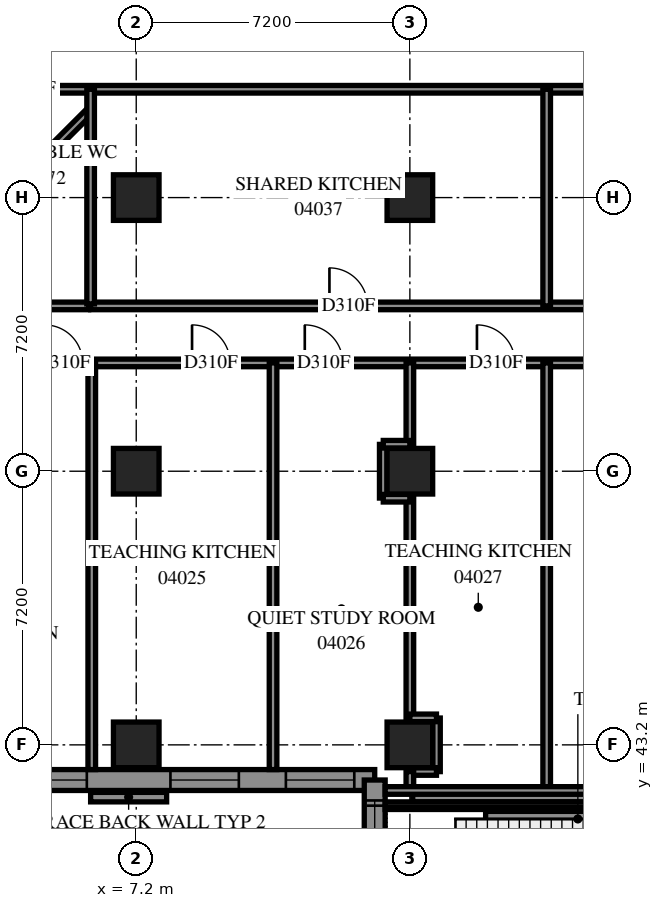
"""IFC4 building model, lengths in metres.
Left out: names, types, materials, properties, quantities, classifications, styles, units other than length and angle.
Written with IfcOpenShell. Run it as: python <this file> out.ifc"""

import sys

from ifc_helpers import new_model, si_unit, direction, frame, frame_2d, origin, origin_2d, place, context, subcontext, project, spatial, polyline, rectangle, outline, extrude, element, fill, save


model = new_model("IFC4")
c1 = context("Model", 3, precision=1e-05, world=origin(), true_north=direction((0.0, 1.0)))
c2 = subcontext(c1, "Body", "Model", "MODEL_VIEW")
j1 = project(units=[si_unit("LENGTHUNIT", "METRE"), si_unit("PLANEANGLEUNIT", "RADIAN")], contexts=[c1])
p1 = place(None, origin())
s1 = spatial("IfcSite", under=j1, at=p1, CompositionType="ELEMENT")
p2 = place(p1, origin())
s2 = spatial("IfcBuilding", under=s1, at=p2, CompositionType="ELEMENT")
p3 = place(p2, frame((0.0, 0.0, 18.6)))
s3 = spatial("IfcBuildingStorey", under=s2, at=p3, CompositionType="ELEMENT", Elevation=18.6)
for number, where, z_axis, x_axis in (
    (1, (7.2, 43.2, 0.0), (0.0, 0.0, 1.0), (1.0, 0.0, 0.0)),
    (2, (7.2, 50.4, 0.0), (0.0, 0.0, 1.0), (1.0, 0.0, 0.0)),
    (3, (7.2, 57.6, 0.0), (0.0, 0.0, 1.0), (1.0, 0.0, 0.0)),
    (4, (14.4, 43.2, 0.0), (0.0, 0.0, 1.0), (1.0, 0.0, 0.0)),
    (5, (14.4, 50.4, 0.0), (0.0, 0.0, 1.0), (1.0, 0.0, 0.0)),
    (6, (14.4, 57.6, 0.0), (0.0, 0.0, 1.0), (1.0, 0.0, 0.0)),
):
    element("IfcColumn", number, at=place(p3, frame(where, z_axis=z_axis, x_axis=x_axis)), inside=s3, PredefinedType="COLUMN", context=c2, shape_type="SweptSolid", body=[
        extrude(rectangle(XDim=1.2, YDim=1.2, at=origin_2d()), origin(), (0.0, 0.0, 1.0), 3.8),
    ])
p4 = place(p3, frame((0.275, 42.275, 0.0), z_axis=(0.0, 0.0, 1.0), x_axis=(1.0, 0.0, 0.0)))
e7 = element("IfcWall", 7, at=p4, inside=s3, PredefinedType="SOLIDWALL", context=c2, shape_type="SweptSolid", body=[
    extrude(outline(polyline([(-0.275, -0.275), (12.925, -0.275), (13.475, 0.275), (0.275, 0.275), (-0.275, -0.275)])), origin(), (0.0, 0.0, 1.0), 3.8),
])
p5 = place(p4, frame((1.0, 0.0, 0.7)))
e8 = element("IfcOpeningElement", 8, at=p5, cuts=e7, PredefinedType="OPENING", context=c2, shape_type="SweptSolid", body=[
    extrude(rectangle(XDim=1.8, YDim=2.4, at=frame_2d((0.9, 1.2))), frame((0.0, 0.285, 0.0), z_axis=(0.0, -1.0, 0.0), x_axis=(1.0, 0.0, 0.0)), (0.0, 0.0, 1.0), 0.57),
])
p6 = place(p4, frame((3.825, 0.0, 0.7)))
e9 = element("IfcOpeningElement", 9, at=p6, cuts=e7, PredefinedType="OPENING", context=c2, shape_type="SweptSolid", body=[
    extrude(rectangle(XDim=1.8, YDim=2.4, at=frame_2d((0.9, 1.2))), frame((0.0, 0.285, 0.0), z_axis=(0.0, -1.0, 0.0), x_axis=(1.0, 0.0, 0.0)), (0.0, 0.0, 1.0), 0.57),
])
p7 = place(p4, frame((7.825, 0.0, 0.7)))
e10 = element("IfcOpeningElement", 10, at=p7, cuts=e7, PredefinedType="OPENING", context=c2, shape_type="SweptSolid", body=[
    extrude(rectangle(XDim=1.8, YDim=2.4, at=frame_2d((0.9, 1.2))), frame((0.0, 0.285, 0.0), z_axis=(0.0, -1.0, 0.0), x_axis=(1.0, 0.0, 0.0)), (0.0, 0.0, 1.0), 0.57),
])
p8 = place(p4, frame((10.863, 0.0, 0.7)))
e11 = element("IfcOpeningElement", 11, at=p8, cuts=e7, PredefinedType="OPENING", context=c2, shape_type="SweptSolid", body=[
    extrude(rectangle(XDim=1.8, YDim=2.4, at=frame_2d((0.9, 1.2))), frame((0.0, 0.285, 0.0), z_axis=(0.0, -1.0, 0.0), x_axis=(1.0, 0.0, 0.0)), (0.0, 0.0, 1.0), 0.57),
])
p9 = place(p3, frame((13.475, 42.275, 0.0), z_axis=(0.0, 0.0, 1.0), x_axis=(0.0, -1.0, 0.0)))
e12 = element("IfcWall", 12, at=p9, inside=s3, PredefinedType="SOLIDWALL", context=c2, shape_type="SweptSolid", body=[
    extrude(outline(polyline([(0.275, -0.275), (7.475, -0.275), (6.925, 0.275), (-0.275, 0.275), (0.275, -0.275)])), origin(), (0.0, 0.0, 1.0), 3.8),
])
p10 = place(p9, frame((0.537, 0.0, 0.7)))
e13 = element("IfcOpeningElement", 13, at=p10, cuts=e12, PredefinedType="OPENING", context=c2, shape_type="SweptSolid", body=[
    extrude(rectangle(XDim=1.8, YDim=2.4, at=frame_2d((0.9, 1.2))), frame((0.0, 0.285, 0.0), z_axis=(0.0, -1.0, 0.0), x_axis=(1.0, 0.0, 0.0)), (0.0, 0.0, 1.0), 0.57),
])
p11 = place(p9, frame((3.575, 0.0, 0.7)))
e14 = element("IfcOpeningElement", 14, at=p11, cuts=e12, PredefinedType="OPENING", context=c2, shape_type="SweptSolid", body=[
    extrude(rectangle(XDim=1.8, YDim=2.4, at=frame_2d((0.9, 1.2))), frame((0.0, 0.285, 0.0), z_axis=(0.0, -1.0, 0.0), x_axis=(1.0, 0.0, 0.0)), (0.0, 0.0, 1.0), 0.57),
])
p12 = place(p3, frame((17.854, 41.15, 0.0), z_axis=(0.0, 0.0, 1.0), x_axis=(0.0, -1.0, 0.0)))
e15 = element("IfcWall", 15, at=p12, inside=s3, PredefinedType="SOLIDWALL", context=c2, shape_type="SweptSolid", body=[
    extrude(rectangle(XDim=1.6, YDim=0.3, at=frame_2d((0.8, 0.0))), origin(), (0.0, 0.0, 1.0), 1.209),
])
p13 = place(p3, frame((0.0, 53.25, 0.0), z_axis=(0.0, 0.0, 1.0), x_axis=(1.0, 0.0, 0.0)))
e16 = element("IfcWall", 16, at=p13, inside=s3, PredefinedType="PARTITIONING", context=c2, shape_type="SweptSolid", body=[
    extrude(rectangle(XDim=55.1, YDim=0.2, at=frame_2d((27.55, 0.0))), origin(), (0.0, 0.0, 1.0), 3.8),
])
p14 = place(p13, frame((8.669, 0.0, 0.0)))
e17 = element("IfcOpeningElement", 17, at=p14, cuts=e16, PredefinedType="OPENING", context=c2, shape_type="SweptSolid", body=[
    extrude(rectangle(XDim=1.0, YDim=2.1, at=frame_2d((0.5, 1.05))), frame((0.0, 0.11, 0.0), z_axis=(0.0, -1.0, 0.0), x_axis=(1.0, 0.0, 0.0)), (0.0, 0.0, 1.0), 0.22),
])
p15 = place(p13, frame((11.635, 0.0, 0.0)))
e18 = element("IfcOpeningElement", 18, at=p15, cuts=e16, PredefinedType="OPENING", context=c2, shape_type="SweptSolid", body=[
    extrude(rectangle(XDim=1.0, YDim=2.1, at=frame_2d((0.5, 1.05))), frame((0.0, 0.11, 0.0), z_axis=(0.0, -1.0, 0.0), x_axis=(1.0, 0.0, 0.0)), (0.0, 0.0, 1.0), 0.22),
])
p16 = place(p13, frame((16.165, 0.0, 0.0)))
e19 = element("IfcOpeningElement", 19, at=p16, cuts=e16, PredefinedType="OPENING", context=c2, shape_type="SweptSolid", body=[
    extrude(rectangle(XDim=1.0, YDim=2.1, at=frame_2d((0.5, 1.05))), frame((0.0, 0.11, 0.0), z_axis=(0.0, -1.0, 0.0), x_axis=(1.0, 0.0, 0.0)), (0.0, 0.0, 1.0), 0.22),
])
p17 = place(p13, frame((20.337, 0.0, 0.0)))
e20 = element("IfcOpeningElement", 20, at=p17, cuts=e16, PredefinedType="OPENING", context=c2, shape_type="SweptSolid", body=[
    extrude(rectangle(XDim=1.0, YDim=2.1, at=frame_2d((0.5, 1.05))), frame((0.0, 0.11, 0.0), z_axis=(0.0, -1.0, 0.0), x_axis=(1.0, 0.0, 0.0)), (0.0, 0.0, 1.0), 0.22),
])
p18 = place(p13, frame((27.538, 0.0, 0.0)))
e21 = element("IfcOpeningElement", 21, at=p18, cuts=e16, PredefinedType="OPENING", context=c2, shape_type="SweptSolid", body=[
    extrude(rectangle(XDim=1.0, YDim=2.1, at=frame_2d((0.5, 1.05))), frame((0.0, 0.11, 0.0), z_axis=(0.0, -1.0, 0.0), x_axis=(1.0, 0.0, 0.0)), (0.0, 0.0, 1.0), 0.22),
])
p19 = place(p13, frame((34.737, 0.0, 0.0)))
e22 = element("IfcOpeningElement", 22, at=p19, cuts=e16, PredefinedType="OPENING", context=c2, shape_type="SweptSolid", body=[
    extrude(rectangle(XDim=1.0, YDim=2.1, at=frame_2d((0.5, 1.05))), frame((0.0, 0.11, 0.0), z_axis=(0.0, -1.0, 0.0), x_axis=(1.0, 0.0, 0.0)), (0.0, 0.0, 1.0), 0.22),
])
p20 = place(p13, frame((40.125, 0.0, 0.0)))
e23 = element("IfcOpeningElement", 23, at=p20, cuts=e16, PredefinedType="OPENING", context=c2, shape_type="SweptSolid", body=[
    extrude(rectangle(XDim=1.0, YDim=2.1, at=frame_2d((0.5, 1.05))), frame((0.0, 0.11, 0.0), z_axis=(0.0, -1.0, 0.0), x_axis=(1.0, 0.0, 0.0)), (0.0, 0.0, 1.0), 0.22),
])
p21 = place(p13, frame((46.758, 0.0, 0.0)))
e24 = element("IfcOpeningElement", 24, at=p21, cuts=e16, PredefinedType="OPENING", context=c2, shape_type="SweptSolid", body=[
    extrude(rectangle(XDim=1.0, YDim=2.1, at=frame_2d((0.5, 1.05))), frame((0.0, 0.11, 0.0), z_axis=(0.0, -1.0, 0.0), x_axis=(1.0, 0.0, 0.0)), (0.0, 0.0, 1.0), 0.22),
])
p22 = place(p13, frame((53.913, 0.0, 0.0)))
e25 = element("IfcOpeningElement", 25, at=p22, cuts=e16, PredefinedType="OPENING", context=c2, shape_type="SweptSolid", body=[
    extrude(rectangle(XDim=1.0, YDim=2.1, at=frame_2d((0.5, 1.05))), frame((0.0, 0.11, 0.0), z_axis=(0.0, -1.0, 0.0), x_axis=(1.0, 0.0, 0.0)), (0.0, 0.0, 1.0), 0.22),
])
p23 = place(p13, frame((2.672, 0.0, 0.0)))
e26 = element("IfcOpeningElement", 26, at=p23, cuts=e16, PredefinedType="OPENING", context=c2, shape_type="SweptSolid", body=[
    extrude(rectangle(XDim=1.0, YDim=2.1, at=frame_2d((0.5, 1.05))), frame((0.0, 0.11, 0.0), z_axis=(0.0, -1.0, 0.0), x_axis=(1.0, 0.0, 0.0)), (0.0, 0.0, 1.0), 0.22),
])
p24 = place(p13, frame((4.788, 0.0, 0.0)))
e27 = element("IfcOpeningElement", 27, at=p24, cuts=e16, PredefinedType="OPENING", context=c2, shape_type="SweptSolid", body=[
    extrude(rectangle(XDim=1.0, YDim=2.1, at=frame_2d((0.5, 1.05))), frame((0.0, 0.11, 0.0), z_axis=(0.0, -1.0, 0.0), x_axis=(1.0, 0.0, 0.0)), (0.0, 0.0, 1.0), 0.22),
])
p25 = place(p3, frame((0.002, 60.45, 0.0), z_axis=(0.0, 0.0, 1.0), x_axis=(1.0, 0.0, 0.0)))
e28 = element("IfcWall", 28, at=p25, inside=s3, PredefinedType="PARTITIONING", context=c2, shape_type="SweptSolid", body=[
    extrude(rectangle(XDim=55.098, YDim=0.2, at=frame_2d((27.549, 0.0))), origin(), (0.0, 0.0, 1.0), 3.8),
])
p26 = place(p25, frame((49.69, 0.0, 0.0)))
e29 = element("IfcOpeningElement", 29, at=p26, cuts=e28, PredefinedType="OPENING", context=c2, shape_type="SweptSolid", body=[
    extrude(rectangle(XDim=1.0, YDim=2.1, at=frame_2d((0.5, 1.05))), frame((0.0, 0.11, 0.0), z_axis=(0.0, -1.0, 0.0), x_axis=(1.0, 0.0, 0.0)), (0.0, 0.0, 1.0), 0.22),
])
p27 = place(p25, frame((3.897, 0.0, 0.0)))
e30 = element("IfcOpeningElement", 30, at=p27, cuts=e28, PredefinedType="OPENING", context=c2, shape_type="SweptSolid", body=[
    extrude(rectangle(XDim=1.0, YDim=2.1, at=frame_2d((0.5, 1.05))), frame((0.0, 0.11, 0.0), z_axis=(0.0, -1.0, 0.0), x_axis=(1.0, 0.0, 0.0)), (0.0, 0.0, 1.0), 0.22),
])
p28 = place(p3, frame((6.0, 54.75, 0.0), z_axis=(0.0, 0.0, 1.0), x_axis=(1.0, 0.0, 0.0)))
e31 = element("IfcWall", 31, at=p28, inside=s3, PredefinedType="PARTITIONING", context=c2, shape_type="SweptSolid", body=[
    extrude(rectangle(XDim=49.1, YDim=0.2, at=frame_2d((24.55, 0.0))), origin(), (0.0, 0.0, 1.0), 3.8),
])
p29 = place(p28, frame((6.284, 0.0, 0.0)))
e32 = element("IfcOpeningElement", 32, at=p29, cuts=e31, PredefinedType="OPENING", context=c2, shape_type="SweptSolid", body=[
    extrude(rectangle(XDim=1.0, YDim=2.1, at=frame_2d((0.5, 1.05))), frame((0.0, 0.11, 0.0), z_axis=(0.0, -1.0, 0.0), x_axis=(1.0, 0.0, 0.0)), (0.0, 0.0, 1.0), 0.22),
])
p30 = place(p28, frame((14.374, 0.0, 0.0)))
e33 = element("IfcOpeningElement", 33, at=p30, cuts=e31, PredefinedType="OPENING", context=c2, shape_type="SweptSolid", body=[
    extrude(rectangle(XDim=1.0, YDim=2.1, at=frame_2d((0.5, 1.05))), frame((0.0, 0.11, 0.0), z_axis=(0.0, -1.0, 0.0), x_axis=(1.0, 0.0, 0.0)), (0.0, 0.0, 1.0), 0.22),
])
p31 = place(p28, frame((19.725, 0.0, 0.0)))
e34 = element("IfcOpeningElement", 34, at=p31, cuts=e31, PredefinedType="OPENING", context=c2, shape_type="SweptSolid", body=[
    extrude(rectangle(XDim=1.0, YDim=2.1, at=frame_2d((0.5, 1.05))), frame((0.0, 0.11, 0.0), z_axis=(0.0, -1.0, 0.0), x_axis=(1.0, 0.0, 0.0)), (0.0, 0.0, 1.0), 0.22),
])
p32 = place(p28, frame((28.183, 0.0, 0.0)))
e35 = element("IfcOpeningElement", 35, at=p32, cuts=e31, PredefinedType="OPENING", context=c2, shape_type="SweptSolid", body=[
    extrude(rectangle(XDim=1.0, YDim=2.1, at=frame_2d((0.5, 1.05))), frame((0.0, 0.11, 0.0), z_axis=(0.0, -1.0, 0.0), x_axis=(1.0, 0.0, 0.0)), (0.0, 0.0, 1.0), 0.22),
])
p33 = place(p28, frame((35.974, 0.0, 0.0)))
e36 = element("IfcOpeningElement", 36, at=p33, cuts=e31, PredefinedType="OPENING", context=c2, shape_type="SweptSolid", body=[
    extrude(rectangle(XDim=1.0, YDim=2.1, at=frame_2d((0.5, 1.05))), frame((0.0, 0.11, 0.0), z_axis=(0.0, -1.0, 0.0), x_axis=(1.0, 0.0, 0.0)), (0.0, 0.0, 1.0), 0.22),
])
p34 = place(p3, frame((18.0, 42.0, 0.0), z_axis=(0.0, 0.0, 1.0), x_axis=(0.0, 1.0, 0.0)))
e37 = element("IfcWall", 37, at=p34, inside=s3, PredefinedType="PARTITIONING", context=c2, shape_type="SweptSolid", body=[
    extrude(rectangle(XDim=11.25, YDim=0.2, at=frame_2d((5.625, 0.0))), origin(), (0.0, 0.0, 1.0), 3.8),
])
for number, where, z_axis, x_axis in (
    (38, (6.03, 42.55, 0.0), (0.0, 0.0, 1.0), (0.0, 1.0, 0.0)),
    (39, (10.8, 42.55, 0.0), (0.0, 0.0, 1.0), (0.0, 1.0, 0.0)),
):
    element("IfcWall", number, at=place(p3, frame(where, z_axis=z_axis, x_axis=x_axis)), inside=s3, PredefinedType="PARTITIONING", context=c2, shape_type="SweptSolid", body=[
        extrude(rectangle(XDim=10.7, YDim=0.2, at=frame_2d((5.35, 0.0))), origin(), (0.0, 0.0, 1.0), 3.8),
    ])
p35 = place(p3, frame((0.855, 54.751, 0.0), z_axis=(0.0, 0.0, 1.0), x_axis=(0.7071067812, 0.7071067812, 0.0)))
e40 = element("IfcWall", 40, at=p35, inside=s3, PredefinedType="PARTITIONING", context=c2, shape_type="SweptSolid", body=[
    extrude(rectangle(XDim=7.275, YDim=0.2, at=frame_2d((3.637, 0.0))), origin(), (0.0, 0.0, 1.0), 3.8),
])
p36 = place(p3, frame((0.0, 54.75, 0.0), z_axis=(0.0, 0.0, 1.0), x_axis=(1.0, 0.0, 0.0)))
e41 = element("IfcWall", 41, at=p36, inside=s3, PredefinedType="PARTITIONING", context=c2, shape_type="SweptSolid", body=[
    extrude(rectangle(XDim=5.948, YDim=0.2, at=frame_2d((2.974, 0.0))), origin(), (0.0, 0.0, 1.0), 3.8),
])
p37 = place(p36, frame((2.25, 0.0, 0.0)))
e42 = element("IfcOpeningElement", 42, at=p37, cuts=e41, PredefinedType="OPENING", context=c2, shape_type="SweptSolid", body=[
    extrude(rectangle(XDim=1.0, YDim=2.1, at=frame_2d((0.5, 1.05))), frame((0.0, 0.11, 0.0), z_axis=(0.0, -1.0, 0.0), x_axis=(1.0, 0.0, 0.0)), (0.0, 0.0, 1.0), 0.22),
])
p38 = place(p3, frame((14.4, 43.906, 0.0), z_axis=(0.0, 0.0, 1.0), x_axis=(0.0, 1.0, 0.0)))
e43 = element("IfcWall", 43, at=p38, inside=s3, PredefinedType="PARTITIONING", context=c2, shape_type="SweptSolid", body=[
    extrude(rectangle(XDim=5.788, YDim=0.2, at=frame_2d((2.894, 0.0))), origin(), (0.0, 0.0, 1.0), 3.8),
])
p39 = place(p3, frame((18.0, 54.75, 0.0), z_axis=(0.0, 0.0, 1.0), x_axis=(0.0, 1.0, 0.0)))
e44 = element("IfcWall", 44, at=p39, inside=s3, PredefinedType="PARTITIONING", context=c2, shape_type="SweptSolid", body=[
    extrude(rectangle(XDim=5.7, YDim=0.2, at=frame_2d((2.85, 0.0))), origin(), (0.0, 0.0, 1.0), 3.8),
])
p40 = place(p3, frame((6.0, 54.802, 0.0), z_axis=(0.0, 0.0, 1.0), x_axis=(0.0, 1.0, 0.0)))
e45 = element("IfcWall", 45, at=p40, inside=s3, PredefinedType="PARTITIONING", context=c2, shape_type="SweptSolid", body=[
    extrude(rectangle(XDim=5.648, YDim=0.2, at=frame_2d((2.824, 0.0))), origin(), (0.0, 0.0, 1.0), 3.8),
])
p41 = place(p3, frame((14.4, 51.106, 0.0), z_axis=(0.0, 0.0, 1.0), x_axis=(0.0, 1.0, 0.0)))
e46 = element("IfcWall", 46, at=p41, inside=s3, PredefinedType="PARTITIONING", context=c2, shape_type="SweptSolid", body=[
    extrude(rectangle(XDim=2.144, YDim=0.2, at=frame_2d((1.072, 0.0))), origin(), (0.0, 0.0, 1.0), 3.8),
])
p42 = place(p3, frame((13.7, 49.694, 0.0), z_axis=(0.0, 0.0, 1.0), x_axis=(0.0, 1.0, 0.0)))
e47 = element("IfcWall", 47, at=p42, inside=s3, PredefinedType="PARTITIONING", context=c2, shape_type="SweptSolid", body=[
    extrude(rectangle(XDim=1.412, YDim=0.2, at=frame_2d((0.706, 0.0))), origin(), (0.0, 0.0, 1.0), 3.8),
])
p43 = place(p3, frame((15.1, 42.496, 0.0), z_axis=(0.0, 0.0, 1.0), x_axis=(0.0, 1.0, 0.0)))
e48 = element("IfcWall", 48, at=p43, inside=s3, PredefinedType="PARTITIONING", context=c2, shape_type="SweptSolid", body=[
    extrude(rectangle(XDim=1.41, YDim=0.2, at=frame_2d((0.705, 0.0))), origin(), (0.0, 0.0, 1.0), 3.8),
])
for number, where, z_axis, x_axis in (
    (49, (13.7, 51.11, 0.0), (0.0, 0.0, 1.0), (1.0, 0.0, 0.0)),
    (50, (13.7, 49.69, 0.0), (0.0, 0.0, 1.0), (1.0, 0.0, 0.0)),
    (51, (14.4, 43.91, 0.0), (0.0, 0.0, 1.0), (1.0, 0.0, 0.0)),
    (52, (14.4, 42.5, 0.0), (0.0, 0.0, 1.0), (1.0, 0.0, 0.0)),
):
    element("IfcWall", number, at=place(p3, frame(where, z_axis=z_axis, x_axis=x_axis)), inside=s3, PredefinedType="PARTITIONING", context=c2, shape_type="SweptSolid", body=[
        extrude(rectangle(XDim=0.7, YDim=0.2, at=frame_2d((0.35, 0.0))), origin(), (0.0, 0.0, 1.0), 3.8),
    ])
p44 = place(p3, frame((14.4, 42.0, 0.0), z_axis=(0.0, 0.0, 1.0), x_axis=(0.0, 1.0, 0.0)))
e53 = element("IfcWall", 53, at=p44, inside=s3, PredefinedType="PARTITIONING", context=c2, shape_type="SweptSolid", body=[
    extrude(rectangle(XDim=0.496, YDim=0.2, at=frame_2d((0.248, 0.0))), origin(), (0.0, 0.0, 1.0), 3.8),
])
p45 = place(p3, frame((71.925, 41.825, 0.0), z_axis=(0.0, 0.0, 1.0), x_axis=(-1.0, 0.0, 0.0)))
e54 = element("IfcWall", 54, at=p45, inside=s3, PredefinedType="SOLIDWALL", context=c2, shape_type="SweptSolid", body=[
    extrude(rectangle(XDim=57.45, YDim=0.25, at=frame_2d((28.725, 0.0))), origin(), (0.0, 0.0, 1.0), 3.8),
])
p46 = place(p45, frame((12.325, 0.0, 0.0)))
e55 = element("IfcOpeningElement", 55, at=p46, cuts=e54, PredefinedType="OPENING", context=c2, shape_type="SweptSolid", body=[
    extrude(rectangle(XDim=1.0, YDim=2.1, at=frame_2d((0.5, 1.05))), frame((0.0, 0.135, 0.0), z_axis=(0.0, -1.0, 0.0), x_axis=(1.0, 0.0, 0.0)), (0.0, 0.0, 1.0), 0.27),
])
p47 = place(p45, frame((44.125, 0.0, 0.0)))
e56 = element("IfcOpeningElement", 56, at=p47, cuts=e54, PredefinedType="OPENING", context=c2, shape_type="SweptSolid", body=[
    extrude(rectangle(XDim=1.0, YDim=2.1, at=frame_2d((0.5, 1.05))), frame((0.0, 0.135, 0.0), z_axis=(0.0, -1.0, 0.0), x_axis=(1.0, 0.0, 0.0)), (0.0, 0.0, 1.0), 0.27),
])
p48 = place(p3, frame((8.0, 41.825, 0.0), z_axis=(0.0, 0.0, 1.0), x_axis=(-1.0, 0.0, 0.0)))
e57 = element("IfcWall", 57, at=p48, inside=s3, PredefinedType="SOLIDWALL", context=c2, shape_type="SweptSolid", body=[
    extrude(rectangle(XDim=2.0, YDim=0.25, at=frame_2d((1.0, 0.0))), origin(), (0.0, 0.0, 1.0), 3.8),
])
p49 = place(p3, frame((13.75, 42.0, 0.0), z_axis=(0.0, 0.0, 1.0), x_axis=(1.0, 0.0, 0.0)))
e58 = element("IfcWall", 58, at=p49, inside=s3, PredefinedType="PARTITIONING", context=c2, shape_type="SweptSolid", body=[
    extrude(outline(polyline([(0.0, -0.1), (12.9, -0.1), (12.9, 0.1), (0.0, 0.1), (0.0, -0.1)])), origin(), (0.0, 0.0, 1.0), 3.8),
])
p50 = place(p3, frame((26.53, 41.6, 0.0), z_axis=(0.0, 0.0, 1.0), x_axis=(-1.0, 0.0, 0.0)))
e59 = element("IfcWall", 59, at=p50, inside=s3, PredefinedType="PARAPET", context=c2, shape_type="SweptSolid", body=[
    extrude(outline(polyline([(0.0, -0.1), (12.78, -0.1), (12.78, 0.1), (0.0, 0.1), (0.0, -0.1)])), origin(), (0.0, 0.0, 1.0), 0.25),
])
p51 = place(p3, frame((19.607, 41.05, 0.0), z_axis=(0.0, 0.0, 1.0), x_axis=(-1.0, 0.0, 0.0)))
e60 = element("IfcWall", 60, at=p51, inside=s3, PredefinedType="SOLIDWALL", context=c2, shape_type="SweptSolid", body=[
    extrude(outline(polyline([(0.0, -0.4), (3.214, -0.4), (3.214, 0.4), (0.0, 0.4), (0.0, -0.4)])), origin(), (0.0, 0.0, 1.0), 0.65),
])
p52 = place(p6, origin())
e61 = element("IfcWindow", 61, at=p52, inside=s3, PartitioningType="SINGLE_PANEL", PredefinedType="WINDOW", context=c2, shape_type="SweptSolid", body=[
    extrude(rectangle(XDim=1.8, YDim=2.4, at=frame_2d((0.9, 1.2))), frame((0.0, 0.155, 0.0), z_axis=(0.0, -1.0, 0.0), x_axis=(1.0, 0.0, 0.0)), (0.0, 0.0, 1.0), 0.06),
])
fill(e9, e61)
p53 = place(p7, origin())
e62 = element("IfcWindow", 62, at=p53, inside=s3, PartitioningType="SINGLE_PANEL", PredefinedType="WINDOW", context=c2, shape_type="SweptSolid", body=[
    extrude(rectangle(XDim=1.8, YDim=2.4, at=frame_2d((0.9, 1.2))), frame((0.0, 0.155, 0.0), z_axis=(0.0, -1.0, 0.0), x_axis=(1.0, 0.0, 0.0)), (0.0, 0.0, 1.0), 0.06),
])
fill(e10, e62)
p54 = place(p8, origin())
e63 = element("IfcWindow", 63, at=p54, inside=s3, PartitioningType="SINGLE_PANEL", PredefinedType="WINDOW", context=c2, shape_type="SweptSolid", body=[
    extrude(rectangle(XDim=1.8, YDim=2.4, at=frame_2d((0.9, 1.2))), frame((0.0, 0.155, 0.0), z_axis=(0.0, -1.0, 0.0), x_axis=(1.0, 0.0, 0.0)), (0.0, 0.0, 1.0), 0.06),
])
fill(e11, e63)
p55 = place(p10, origin())
e64 = element("IfcWindow", 64, at=p55, inside=s3, PartitioningType="SINGLE_PANEL", PredefinedType="WINDOW", context=c2, shape_type="SweptSolid", body=[
    extrude(rectangle(XDim=1.8, YDim=2.4, at=frame_2d((0.9, 1.2))), frame((0.0, 0.155, 0.0), z_axis=(0.0, -1.0, 0.0), x_axis=(1.0, 0.0, 0.0)), (0.0, 0.0, 1.0), 0.06),
])
fill(e13, e64)
p56 = place(p14, origin())
e65 = element("IfcDoor", 65, at=p56, inside=s3, OperationType="SINGLE_SWING_LEFT", PredefinedType="DOOR", context=c2, shape_type="SweptSolid", body=[
    extrude(rectangle(XDim=1.0, YDim=2.1, at=frame_2d((0.5, 1.05))), frame((0.0, 0.025, 0.0), z_axis=(0.0, -1.0, 0.0), x_axis=(1.0, 0.0, 0.0)), (0.0, 0.0, 1.0), 0.05),
])
fill(e17, e65)
p57 = place(p15, origin())
e66 = element("IfcDoor", 66, at=p57, inside=s3, OperationType="SINGLE_SWING_RIGHT", PredefinedType="DOOR", context=c2, shape_type="SweptSolid", body=[
    extrude(rectangle(XDim=1.0, YDim=2.1, at=frame_2d((0.5, 1.05))), frame((0.0, 0.025, 0.0), z_axis=(0.0, -1.0, 0.0), x_axis=(1.0, 0.0, 0.0)), (0.0, 0.0, 1.0), 0.05),
])
fill(e18, e66)
p58 = place(p16, origin())
e67 = element("IfcDoor", 67, at=p58, inside=s3, OperationType="SINGLE_SWING_LEFT", PredefinedType="DOOR", context=c2, shape_type="SweptSolid", body=[
    extrude(rectangle(XDim=1.0, YDim=2.1, at=frame_2d((0.5, 1.05))), frame((0.0, 0.025, 0.0), z_axis=(0.0, -1.0, 0.0), x_axis=(1.0, 0.0, 0.0)), (0.0, 0.0, 1.0), 0.05),
])
fill(e19, e67)
p59 = place(p29, origin())
e68 = element("IfcDoor", 68, at=p59, inside=s3, OperationType="SINGLE_SWING_RIGHT", PredefinedType="DOOR", context=c2, shape_type="SweptSolid", body=[
    extrude(rectangle(XDim=1.0, YDim=2.1, at=frame_2d((0.5, 1.05))), frame((0.0, 0.025, 0.0), z_axis=(0.0, -1.0, 0.0), x_axis=(1.0, 0.0, 0.0)), (0.0, 0.0, 1.0), 0.05),
])
fill(e32, e68)
p60 = place(p24, origin())
e69 = element("IfcDoor", 69, at=p60, inside=s3, OperationType="SINGLE_SWING_LEFT", PredefinedType="DOOR", context=c2, shape_type="SweptSolid", body=[
    extrude(rectangle(XDim=1.0, YDim=2.1, at=frame_2d((0.5, 1.05))), frame((0.0, 0.025, 0.0), z_axis=(0.0, -1.0, 0.0), x_axis=(1.0, 0.0, 0.0)), (0.0, 0.0, 1.0), 0.05),
])
fill(e27, e69)
save(model, sys.argv[1])
